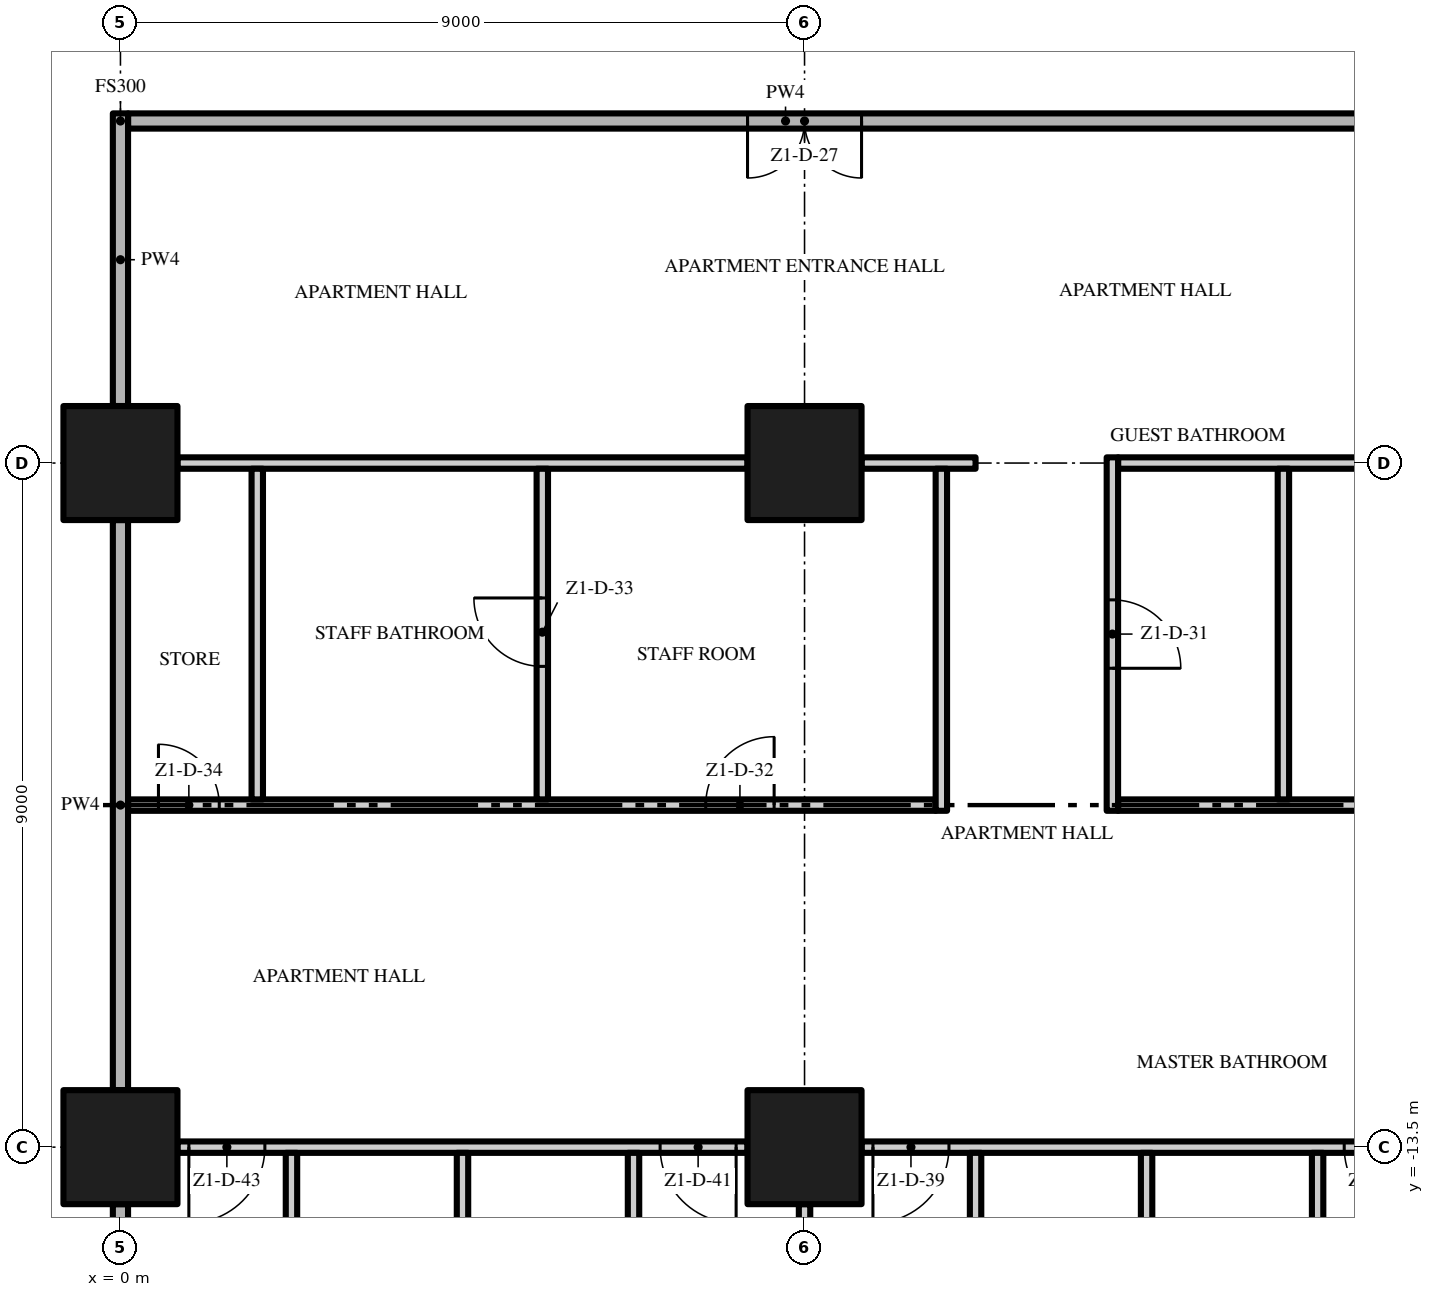
"""IFC4 building model, lengths in metres.
Left out: names, types, materials, properties, quantities, classifications, styles, units other than length and angle.
Written with IfcOpenShell. Run it as: python <this file> out.ifc"""

import sys

from ifc_helpers import new_model, si_unit, direction, frame, frame_2d, origin, origin_2d, place, context, subcontext, project, spatial, rectangle, extrude, element, fill, save


model = new_model("IFC4")
c1 = context("Model", 3, precision=1e-05, world=origin(), true_north=direction((0.0, 1.0)))
c2 = subcontext(c1, "Body", "Model", "MODEL_VIEW")
j1 = project(units=[si_unit("LENGTHUNIT", "METRE"), si_unit("PLANEANGLEUNIT", "RADIAN")], contexts=[c1])
p1 = place(None, origin())
s1 = spatial("IfcSite", under=j1, at=p1, CompositionType="ELEMENT")
p2 = place(p1, origin())
s2 = spatial("IfcBuilding", under=s1, at=p2, CompositionType="ELEMENT")
p3 = place(p2, frame((0.0, 0.0, 49.2)))
s3 = spatial("IfcBuildingStorey", under=s2, at=p3, CompositionType="ELEMENT", Elevation=49.2)
for number, where, z_axis, x_axis in (
    (1, (0.0, -13.5, 0.0), (0.0, 0.0, 1.0), (1.0, 0.0, 0.0)),
    (2, (0.0, -4.5, 0.0), (0.0, 0.0, 1.0), (1.0, 0.0, 0.0)),
    (3, (9.0, -13.5, 0.0), (0.0, 0.0, 1.0), (1.0, 0.0, 0.0)),
    (4, (9.0, -4.5, 0.0), (0.0, 0.0, 1.0), (1.0, 0.0, 0.0)),
):
    element("IfcColumn", number, at=place(p3, frame(where, z_axis=z_axis, x_axis=x_axis)), inside=s3, PredefinedType="COLUMN", context=c2, shape_type="SweptSolid", body=[
        extrude(rectangle(XDim=1.5, YDim=1.5, at=origin_2d()), origin(), (0.0, 0.0, 1.0), 3.5),
    ])
p4 = place(p3, frame((8.25, -13.5, 0.0), z_axis=(0.0, 0.0, 1.0), x_axis=(-1.0, 0.0, 0.0)))
e5 = element("IfcWall", 5, at=p4, inside=s3, PredefinedType="PARTITIONING", context=c2, shape_type="SweptSolid", body=[
    extrude(rectangle(XDim=7.5, YDim=0.15, at=frame_2d((3.75, 0.0))), origin(), (0.0, 0.0, 1.0), 3.5),
])
p5 = place(p4, frame((0.15, 0.0, 0.0)))
e6 = element("IfcOpeningElement", 6, at=p5, cuts=e5, PredefinedType="OPENING", context=c2, shape_type="SweptSolid", body=[
    extrude(rectangle(XDim=1.0, YDim=2.4, at=frame_2d((0.5, 1.2))), frame((0.0, 0.085, 0.0), z_axis=(0.0, -1.0, 0.0), x_axis=(1.0, 0.0, 0.0)), (0.0, 0.0, 1.0), 0.17),
])
p6 = place(p4, frame((6.35, 0.0, 0.0)))
e7 = element("IfcOpeningElement", 7, at=p6, cuts=e5, PredefinedType="OPENING", context=c2, shape_type="SweptSolid", body=[
    extrude(rectangle(XDim=1.0, YDim=2.4, at=frame_2d((0.5, 1.2))), frame((0.0, 0.085, 0.0), z_axis=(0.0, -1.0, 0.0), x_axis=(1.0, 0.0, 0.0)), (0.0, 0.0, 1.0), 0.17),
])
p7 = place(p3, frame((17.25, -13.5, 0.0), z_axis=(0.0, 0.0, 1.0), x_axis=(-1.0, 0.0, 0.0)))
e8 = element("IfcWall", 8, at=p7, inside=s3, PredefinedType="PARTITIONING", context=c2, shape_type="SweptSolid", body=[
    extrude(rectangle(XDim=7.5, YDim=0.15, at=frame_2d((3.75, 0.0))), origin(), (0.0, 0.0, 1.0), 3.5),
])
p8 = place(p7, frame((0.15, 0.0, 0.0)))
e9 = element("IfcOpeningElement", 9, at=p8, cuts=e8, PredefinedType="OPENING", context=c2, shape_type="SweptSolid", body=[
    extrude(rectangle(XDim=1.0, YDim=2.4, at=frame_2d((0.5, 1.2))), frame((0.0, 0.085, 0.0), z_axis=(0.0, -1.0, 0.0), x_axis=(1.0, 0.0, 0.0)), (0.0, 0.0, 1.0), 0.17),
])
p9 = place(p7, frame((6.35, 0.0, 0.0)))
e10 = element("IfcOpeningElement", 10, at=p9, cuts=e8, PredefinedType="OPENING", context=c2, shape_type="SweptSolid", body=[
    extrude(rectangle(XDim=1.0, YDim=2.4, at=frame_2d((0.5, 1.2))), frame((0.0, 0.085, 0.0), z_axis=(0.0, -1.0, 0.0), x_axis=(1.0, 0.0, 0.0)), (0.0, 0.0, 1.0), 0.17),
])
p10 = place(p3, frame((0.1, -9.0, 0.0), z_axis=(0.0, 0.0, 1.0), x_axis=(1.0, 0.0, 0.0)))
e11 = element("IfcWall", 11, at=p10, inside=s3, PredefinedType="PARTITIONING", context=c2, shape_type="SweptSolid", body=[
    extrude(rectangle(XDim=10.625, YDim=0.15, at=frame_2d((5.312, 0.0))), origin(), (0.0, 0.0, 1.0), 3.5),
])
p11 = place(p10, frame((7.6, 0.0, 0.0)))
e12 = element("IfcOpeningElement", 12, at=p11, cuts=e11, PredefinedType="OPENING", context=c2, shape_type="SweptSolid", body=[
    extrude(rectangle(XDim=0.9, YDim=2.1, at=frame_2d((0.45, 1.05))), frame((0.0, 0.085, 0.0), z_axis=(0.0, -1.0, 0.0), x_axis=(1.0, 0.0, 0.0)), (0.0, 0.0, 1.0), 0.17),
])
p12 = place(p10, frame((0.4, 0.0, 0.0)))
e13 = element("IfcOpeningElement", 13, at=p12, cuts=e11, PredefinedType="OPENING", context=c2, shape_type="SweptSolid", body=[
    extrude(rectangle(XDim=0.8, YDim=2.0, at=frame_2d((0.4, 1.0))), frame((0.0, 0.085, 0.0), z_axis=(0.0, -1.0, 0.0), x_axis=(1.0, 0.0, 0.0)), (0.0, 0.0, 1.0), 0.17),
])
p13 = place(p3, frame((13.125, -9.0, 0.0), z_axis=(0.0, 0.0, 1.0), x_axis=(1.0, 0.0, 0.0)))
e14 = element("IfcWall", 14, at=p13, inside=s3, PredefinedType="PARTITIONING", context=c2, shape_type="SweptSolid", body=[
    extrude(rectangle(XDim=13.575, YDim=0.15, at=frame_2d((6.787, 0.0))), origin(), (0.0, 0.0, 1.0), 3.5),
])
p14 = place(p3, frame((0.75, -4.5, 0.0), z_axis=(0.0, 0.0, 1.0), x_axis=(1.0, 0.0, 0.0)))
e15 = element("IfcWall", 15, at=p14, inside=s3, PredefinedType="PARTITIONING", context=c2, shape_type="SweptSolid", body=[
    extrude(rectangle(XDim=7.5, YDim=0.15, at=frame_2d((3.75, 0.0))), origin(), (0.0, 0.0, 1.0), 3.5),
])
p15 = place(p3, frame((9.75, -4.5, 0.0), z_axis=(0.0, 0.0, 1.0), x_axis=(1.0, 0.0, 0.0)))
e16 = element("IfcWall", 16, at=p15, inside=s3, PredefinedType="PARTITIONING", context=c2, shape_type="SweptSolid", body=[
    extrude(rectangle(XDim=1.5, YDim=0.15, at=frame_2d((0.75, 0.0))), origin(), (0.0, 0.0, 1.0), 3.5),
])
p16 = place(p3, frame((13.125, -4.5, 0.0), z_axis=(0.0, 0.0, 1.0), x_axis=(1.0, 0.0, 0.0)))
e17 = element("IfcWall", 17, at=p16, inside=s3, PredefinedType="PARTITIONING", context=c2, shape_type="SweptSolid", body=[
    extrude(rectangle(XDim=4.125, YDim=0.15, at=frame_2d((2.062, 0.0))), origin(), (0.0, 0.0, 1.0), 3.5),
])
p17 = place(p3, frame((17.4, 0.0, 0.0), z_axis=(0.0, 0.0, 1.0), x_axis=(-1.0, 0.0, 0.0)))
e18 = element("IfcWall", 18, at=p17, inside=s3, PredefinedType="PARTITIONING", context=c2, shape_type="SweptSolid", body=[
    extrude(rectangle(XDim=17.3, YDim=0.2, at=frame_2d((8.65, 0.0))), origin(), (0.0, 0.0, 1.0), 3.5),
])
p18 = place(p17, frame((7.65, 0.0, 0.0)))
e19 = element("IfcOpeningElement", 19, at=p18, cuts=e18, PredefinedType="OPENING", context=c2, shape_type="SweptSolid", body=[
    extrude(rectangle(XDim=1.5, YDim=2.4, at=frame_2d((0.75, 1.2))), frame((0.0, 0.11, 0.0), z_axis=(0.0, -1.0, 0.0), x_axis=(1.0, 0.0, 0.0)), (0.0, 0.0, 1.0), 0.22),
])
p19 = place(p3, frame((0.0, -21.1, 0.0), z_axis=(0.0, 0.0, 1.0), x_axis=(0.0, 1.0, 0.0)))
e20 = element("IfcWall", 20, at=p19, inside=s3, PredefinedType="PARTITIONING", context=c2, shape_type="SweptSolid", body=[
    extrude(rectangle(XDim=6.85, YDim=0.2, at=frame_2d((3.425, 0.0))), origin(), (0.0, 0.0, 1.0), 3.5),
])
p20 = place(p3, frame((0.0, -12.75, 0.0), z_axis=(0.0, 0.0, 1.0), x_axis=(0.0, 1.0, 0.0)))
e21 = element("IfcWall", 21, at=p20, inside=s3, PredefinedType="PARTITIONING", context=c2, shape_type="SweptSolid", body=[
    extrude(rectangle(XDim=7.5, YDim=0.2, at=frame_2d((3.75, 0.0))), origin(), (0.0, 0.0, 1.0), 3.5),
])
p21 = place(p3, frame((0.0, -3.75, 0.0), z_axis=(0.0, 0.0, 1.0), x_axis=(0.0, 1.0, 0.0)))
e22 = element("IfcWall", 22, at=p21, inside=s3, PredefinedType="PARTITIONING", context=c2, shape_type="SweptSolid", body=[
    extrude(rectangle(XDim=3.85, YDim=0.2, at=frame_2d((1.925, 0.0))), origin(), (0.0, 0.0, 1.0), 3.5),
])
p22 = place(p3, frame((1.8, -8.925, 0.0), z_axis=(0.0, 0.0, 1.0), x_axis=(0.0, 1.0, 0.0)))
e23 = element("IfcWall", 23, at=p22, inside=s3, PredefinedType="PARTITIONING", context=c2, shape_type="SweptSolid", body=[
    extrude(rectangle(XDim=4.35, YDim=0.15, at=frame_2d((2.175, 0.0))), origin(), (0.0, 0.0, 1.0), 3.5),
])
p23 = place(p3, frame((2.25, -16.575, 0.0), z_axis=(0.0, 0.0, 1.0), x_axis=(0.0, 1.0, 0.0)))
e24 = element("IfcWall", 24, at=p23, inside=s3, PredefinedType="PARTITIONING", context=c2, shape_type="SweptSolid", body=[
    extrude(rectangle(XDim=3.0, YDim=0.15, at=frame_2d((1.5, 0.0))), origin(), (0.0, 0.0, 1.0), 3.5),
])
p24 = place(p3, frame((4.5, -22.2, 0.0), z_axis=(0.0, 0.0, 1.0), x_axis=(0.0, 1.0, 0.0)))
e25 = element("IfcWall", 25, at=p24, inside=s3, PredefinedType="PARTITIONING", context=c2, shape_type="SweptSolid", body=[
    extrude(rectangle(XDim=8.625, YDim=0.15, at=frame_2d((4.312, 0.0))), origin(), (0.0, 0.0, 1.0), 3.5),
])
p25 = place(p3, frame((5.55, -8.925, 0.0), z_axis=(0.0, 0.0, 1.0), x_axis=(0.0, 1.0, 0.0)))
e26 = element("IfcWall", 26, at=p25, inside=s3, PredefinedType="PARTITIONING", context=c2, shape_type="SweptSolid", body=[
    extrude(rectangle(XDim=4.35, YDim=0.15, at=frame_2d((2.175, 0.0))), origin(), (0.0, 0.0, 1.0), 3.5),
])
p26 = place(p25, frame((1.75, 0.0, 0.0)))
e27 = element("IfcOpeningElement", 27, at=p26, cuts=e26, PredefinedType="OPENING", context=c2, shape_type="SweptSolid", body=[
    extrude(rectangle(XDim=0.9, YDim=2.1, at=frame_2d((0.45, 1.05))), frame((0.0, 0.085, 0.0), z_axis=(0.0, -1.0, 0.0), x_axis=(1.0, 0.0, 0.0)), (0.0, 0.0, 1.0), 0.17),
])
p27 = place(p3, frame((6.75, -16.575, 0.0), z_axis=(0.0, 0.0, 1.0), x_axis=(0.0, 1.0, 0.0)))
e28 = element("IfcWall", 28, at=p27, inside=s3, PredefinedType="PARTITIONING", context=c2, shape_type="SweptSolid", body=[
    extrude(rectangle(XDim=3.0, YDim=0.15, at=frame_2d((1.5, 0.0))), origin(), (0.0, 0.0, 1.0), 3.5),
])
p28 = place(p3, frame((9.0, -21.1, 0.0), z_axis=(0.0, 0.0, 1.0), x_axis=(0.0, 1.0, 0.0)))
e29 = element("IfcWall", 29, at=p28, inside=s3, PredefinedType="PARTITIONING", context=c2, shape_type="SweptSolid", body=[
    extrude(rectangle(XDim=6.85, YDim=0.15, at=frame_2d((3.425, 0.0))), origin(), (0.0, 0.0, 1.0), 3.5),
])
p29 = place(p3, frame((10.8, -9.075, 0.0), z_axis=(0.0, 0.0, 1.0), x_axis=(0.0, 1.0, 0.0)))
e30 = element("IfcWall", 30, at=p29, inside=s3, PredefinedType="PARTITIONING", context=c2, shape_type="SweptSolid", body=[
    extrude(rectangle(XDim=4.5, YDim=0.15, at=frame_2d((2.25, 0.0))), origin(), (0.0, 0.0, 1.0), 3.5),
])
p30 = place(p3, frame((11.25, -16.575, 0.0), z_axis=(0.0, 0.0, 1.0), x_axis=(0.0, 1.0, 0.0)))
e31 = element("IfcWall", 31, at=p30, inside=s3, PredefinedType="PARTITIONING", context=c2, shape_type="SweptSolid", body=[
    extrude(rectangle(XDim=3.0, YDim=0.15, at=frame_2d((1.5, 0.0))), origin(), (0.0, 0.0, 1.0), 3.5),
])
p31 = place(p3, frame((13.05, -4.425, 0.0), z_axis=(0.0, 0.0, 1.0), x_axis=(0.0, -1.0, 0.0)))
e32 = element("IfcWall", 32, at=p31, inside=s3, PredefinedType="PARTITIONING", context=c2, shape_type="SweptSolid", body=[
    extrude(rectangle(XDim=4.65, YDim=0.15, at=frame_2d((2.325, 0.0))), origin(), (0.0, 0.0, 1.0), 3.5),
])
p32 = place(p31, frame((1.875, 0.0, 0.0)))
e33 = element("IfcOpeningElement", 33, at=p32, cuts=e32, PredefinedType="OPENING", context=c2, shape_type="SweptSolid", body=[
    extrude(rectangle(XDim=0.9, YDim=2.1, at=frame_2d((0.45, 1.05))), frame((0.0, 0.085, 0.0), z_axis=(0.0, -1.0, 0.0), x_axis=(1.0, 0.0, 0.0)), (0.0, 0.0, 1.0), 0.17),
])
p33 = place(p3, frame((13.5, -22.2, 0.0), z_axis=(0.0, 0.0, 1.0), x_axis=(0.0, 1.0, 0.0)))
e34 = element("IfcWall", 34, at=p33, inside=s3, PredefinedType="PARTITIONING", context=c2, shape_type="SweptSolid", body=[
    extrude(rectangle(XDim=8.625, YDim=0.15, at=frame_2d((4.312, 0.0))), origin(), (0.0, 0.0, 1.0), 3.5),
])
p34 = place(p3, frame((15.3, -8.925, 0.0), z_axis=(0.0, 0.0, 1.0), x_axis=(0.0, 1.0, 0.0)))
e35 = element("IfcWall", 35, at=p34, inside=s3, PredefinedType="PARTITIONING", context=c2, shape_type="SweptSolid", body=[
    extrude(rectangle(XDim=4.35, YDim=0.15, at=frame_2d((2.175, 0.0))), origin(), (0.0, 0.0, 1.0), 3.5),
])
p35 = place(p3, frame((15.75, -16.575, 0.0), z_axis=(0.0, 0.0, 1.0), x_axis=(0.0, 1.0, 0.0)))
e36 = element("IfcWall", 36, at=p35, inside=s3, PredefinedType="PARTITIONING", context=c2, shape_type="SweptSolid", body=[
    extrude(rectangle(XDim=3.0, YDim=0.15, at=frame_2d((1.5, 0.0))), origin(), (0.0, 0.0, 1.0), 3.5),
])
p36 = place(p18, origin())
e37 = element("IfcDoor", 37, at=p36, inside=s3, OperationType="DOUBLE_DOOR_SINGLE_SWING", PredefinedType="DOOR", context=c2, shape_type="SweptSolid", body=[
    extrude(rectangle(XDim=1.5, YDim=2.4, at=frame_2d((0.75, 1.2))), frame((0.0, 0.025, 0.0), z_axis=(0.0, -1.0, 0.0), x_axis=(1.0, 0.0, 0.0)), (0.0, 0.0, 1.0), 0.05),
])
fill(e19, e37)
p37 = place(p32, origin())
e38 = element("IfcDoor", 38, at=p37, inside=s3, OperationType="SINGLE_SWING_RIGHT", PredefinedType="DOOR", context=c2, shape_type="SweptSolid", body=[
    extrude(rectangle(XDim=0.9, YDim=2.1, at=frame_2d((0.45, 1.05))), frame((0.0, 0.025, 0.0), z_axis=(0.0, -1.0, 0.0), x_axis=(1.0, 0.0, 0.0)), (0.0, 0.0, 1.0), 0.05),
])
fill(e33, e38)
p38 = place(p11, origin())
e39 = element("IfcDoor", 39, at=p38, inside=s3, OperationType="SINGLE_SWING_RIGHT", PredefinedType="DOOR", context=c2, shape_type="SweptSolid", body=[
    extrude(rectangle(XDim=0.9, YDim=2.1, at=frame_2d((0.45, 1.05))), frame((0.0, 0.025, 0.0), z_axis=(0.0, -1.0, 0.0), x_axis=(1.0, 0.0, 0.0)), (0.0, 0.0, 1.0), 0.05),
])
fill(e12, e39)
p39 = place(p26, origin())
e40 = element("IfcDoor", 40, at=p39, inside=s3, OperationType="SINGLE_SWING_RIGHT", PredefinedType="DOOR", context=c2, shape_type="SweptSolid", body=[
    extrude(rectangle(XDim=0.9, YDim=2.1, at=frame_2d((0.45, 1.05))), frame((0.0, 0.025, 0.0), z_axis=(0.0, -1.0, 0.0), x_axis=(1.0, 0.0, 0.0)), (0.0, 0.0, 1.0), 0.05),
])
fill(e27, e40)
p40 = place(p12, origin())
e41 = element("IfcDoor", 41, at=p40, inside=s3, OperationType="SINGLE_SWING_LEFT", PredefinedType="DOOR", context=c2, shape_type="SweptSolid", body=[
    extrude(rectangle(XDim=0.8, YDim=2.0, at=frame_2d((0.4, 1.0))), frame((0.0, 0.025, 0.0), z_axis=(0.0, -1.0, 0.0), x_axis=(1.0, 0.0, 0.0)), (0.0, 0.0, 1.0), 0.05),
])
fill(e13, e41)
p41 = place(p8, origin())
e42 = element("IfcDoor", 42, at=p41, inside=s3, OperationType="SINGLE_SWING_LEFT", PredefinedType="DOOR", context=c2, shape_type="SweptSolid", body=[
    extrude(rectangle(XDim=1.0, YDim=2.4, at=frame_2d((0.5, 1.2))), frame((0.0, 0.025, 0.0), z_axis=(0.0, -1.0, 0.0), x_axis=(1.0, 0.0, 0.0)), (0.0, 0.0, 1.0), 0.05),
])
fill(e9, e42)
p42 = place(p9, origin())
e43 = element("IfcDoor", 43, at=p42, inside=s3, OperationType="SINGLE_SWING_RIGHT", PredefinedType="DOOR", context=c2, shape_type="SweptSolid", body=[
    extrude(rectangle(XDim=1.0, YDim=2.4, at=frame_2d((0.5, 1.2))), frame((0.0, 0.025, 0.0), z_axis=(0.0, -1.0, 0.0), x_axis=(1.0, 0.0, 0.0)), (0.0, 0.0, 1.0), 0.05),
])
fill(e10, e43)
p43 = place(p5, origin())
e44 = element("IfcDoor", 44, at=p43, inside=s3, OperationType="SINGLE_SWING_LEFT", PredefinedType="DOOR", context=c2, shape_type="SweptSolid", body=[
    extrude(rectangle(XDim=1.0, YDim=2.4, at=frame_2d((0.5, 1.2))), frame((0.0, 0.025, 0.0), z_axis=(0.0, -1.0, 0.0), x_axis=(1.0, 0.0, 0.0)), (0.0, 0.0, 1.0), 0.05),
])
fill(e6, e44)
p44 = place(p6, origin())
e45 = element("IfcDoor", 45, at=p44, inside=s3, OperationType="SINGLE_SWING_RIGHT", PredefinedType="DOOR", context=c2, shape_type="SweptSolid", body=[
    extrude(rectangle(XDim=1.0, YDim=2.4, at=frame_2d((0.5, 1.2))), frame((0.0, 0.025, 0.0), z_axis=(0.0, -1.0, 0.0), x_axis=(1.0, 0.0, 0.0)), (0.0, 0.0, 1.0), 0.05),
])
fill(e7, e45)
save(model, sys.argv[1])
